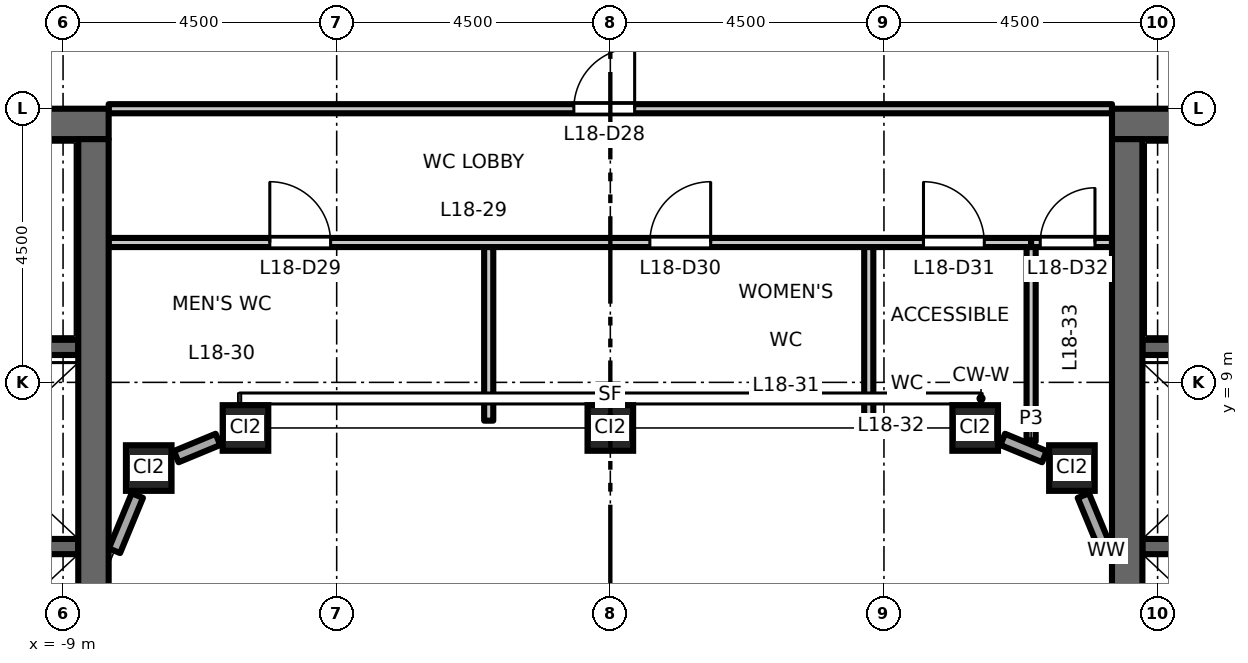
"""IFC4 building model, lengths in metres.
Left out: names, types, materials, properties, quantities, classifications, styles, units other than length and angle.
Written with IfcOpenShell. Run it as: python <this file> out.ifc"""

import sys

from ifc_helpers import new_model, si_unit, direction, frame, frame_2d, origin, origin_2d, place, context, subcontext, project, spatial, rectangle, hollow_rectangle, extrude, element, fill, save


model = new_model("IFC4")
c1 = context("Model", 3, precision=1e-05, world=origin(), true_north=direction((0.0, 1.0)))
c2 = subcontext(c1, "Body", "Model", "MODEL_VIEW")
j1 = project(units=[si_unit("LENGTHUNIT", "METRE"), si_unit("PLANEANGLEUNIT", "RADIAN")], contexts=[c1])
p1 = place(None, origin())
s1 = spatial("IfcSite", under=j1, at=p1, CompositionType="ELEMENT")
p2 = place(p1, origin())
s2 = spatial("IfcBuilding", under=s1, at=p2, CompositionType="ELEMENT")
p3 = place(p2, frame((0.0, 0.0, 85.2)))
s3 = spatial("IfcBuildingStorey", under=s2, at=p3, CompositionType="ELEMENT", Elevation=85.2)
for number, where, z_axis, x_axis in (
    (1, (-7.591, 7.591, 0.0), (0.0, 0.0, 1.0), (1.0, 0.0, 0.0)),
    (2, (-6.0, 8.25, 0.0), (0.0, 0.0, 1.0), (1.0, 0.0, 0.0)),
    (3, (0.0, 8.25, 0.0), (0.0, 0.0, 1.0), (1.0, 0.0, 0.0)),
    (4, (6.0, 8.25, 0.0), (0.0, 0.0, 1.0), (1.0, 0.0, 0.0)),
    (5, (7.591, 7.591, 0.0), (0.0, 0.0, 1.0), (1.0, 0.0, 0.0)),
):
    element("IfcColumn", number, at=place(p3, frame(where, z_axis=z_axis, x_axis=x_axis)), inside=s3, PredefinedType="COLUMN", context=c2, shape_type="SweptSolid", body=[
        extrude(hollow_rectangle(XDim=0.75, YDim=0.75, WallThickness=0.045, at=origin_2d()), origin(), (0.0, 0.0, 1.0), 4.5),
    ])
p4 = place(p3, frame((-8.75, 6.3, 0.0), z_axis=(0.0, 0.0, 1.0), x_axis=(-1.0, 0.0, 0.0)))
e6 = element("IfcWall", 6, at=p4, inside=s3, PredefinedType="SHEAR", context=c2, shape_type="SweptSolid", body=[
    extrude(rectangle(XDim=3.1, YDim=0.25, at=frame_2d((1.55, 0.0))), origin(), (0.0, 0.0, 1.0), 4.35),
])
p5 = place(p3, frame((-8.75, 9.575, 0.0), z_axis=(0.0, 0.0, 1.0), x_axis=(-1.0, 0.0, 0.0)))
e7 = element("IfcWall", 7, at=p5, inside=s3, PredefinedType="SHEAR", context=c2, shape_type="SweptSolid", body=[
    extrude(rectangle(XDim=8.0, YDim=0.25, at=frame_2d((4.0, 0.0))), origin(), (0.0, 0.0, 1.0), 4.35),
])
p6 = place(p5, frame((6.65, 0.0, 0.0)))
e8 = element("IfcOpeningElement", 8, at=p6, cuts=e7, PredefinedType="OPENING", context=c2, shape_type="SweptSolid", body=[
    extrude(rectangle(XDim=1.1, YDim=2.1, at=frame_2d((0.55, 1.05))), frame((0.0, 0.135, 0.0), z_axis=(0.0, -1.0, 0.0), x_axis=(1.0, 0.0, 0.0)), (0.0, 0.0, 1.0), 0.27),
])
p7 = place(p3, frame((-8.25, 13.25, 0.0), z_axis=(0.0, 0.0, 1.0), x_axis=(-1.0, 0.0, 0.0)))
e9 = element("IfcWall", 9, at=p7, inside=s3, PredefinedType="SHEAR", context=c2, shape_type="SweptSolid", body=[
    extrude(rectangle(XDim=13.5, YDim=0.5, at=frame_2d((6.75, 0.0))), origin(), (0.0, 0.0, 1.0), 4.35),
])
p8 = place(p3, frame((-8.5, -13.0, 0.0), z_axis=(0.0, 0.0, 1.0), x_axis=(0.0, 1.0, 0.0)))
e10 = element("IfcWall", 10, at=p8, inside=s3, PredefinedType="SHEAR", context=c2, shape_type="SweptSolid", body=[
    extrude(rectangle(XDim=26.0, YDim=0.5, at=frame_2d((13.0, 0.0))), origin(), (0.0, 0.0, 1.0), 4.35),
])
p9 = place(p3, frame((8.75, 6.3, 0.0), z_axis=(0.0, 0.0, 1.0), x_axis=(1.0, 0.0, 0.0)))
e11 = element("IfcWall", 11, at=p9, inside=s3, PredefinedType="SHEAR", context=c2, shape_type="SweptSolid", body=[
    extrude(rectangle(XDim=3.1, YDim=0.25, at=frame_2d((1.55, 0.0))), origin(), (0.0, 0.0, 1.0), 4.35),
])
p10 = place(p3, frame((8.75, 9.575, 0.0), z_axis=(0.0, 0.0, 1.0), x_axis=(1.0, 0.0, 0.0)))
e12 = element("IfcWall", 12, at=p10, inside=s3, PredefinedType="SHEAR", context=c2, shape_type="SweptSolid", body=[
    extrude(rectangle(XDim=8.0, YDim=0.25, at=frame_2d((4.0, 0.0))), origin(), (0.0, 0.0, 1.0), 4.35),
])
p11 = place(p10, frame((6.65, 0.0, 0.0)))
e13 = element("IfcOpeningElement", 13, at=p11, cuts=e12, PredefinedType="OPENING", context=c2, shape_type="SweptSolid", body=[
    extrude(rectangle(XDim=1.1, YDim=2.1, at=frame_2d((0.55, 1.05))), frame((0.0, 0.135, 0.0), z_axis=(0.0, -1.0, 0.0), x_axis=(1.0, 0.0, 0.0)), (0.0, 0.0, 1.0), 0.27),
])
p12 = place(p3, frame((8.25, 13.25, 0.0), z_axis=(0.0, 0.0, 1.0), x_axis=(1.0, 0.0, 0.0)))
e14 = element("IfcWall", 14, at=p12, inside=s3, PredefinedType="SHEAR", context=c2, shape_type="SweptSolid", body=[
    extrude(rectangle(XDim=13.5, YDim=0.5, at=frame_2d((6.75, 0.0))), origin(), (0.0, 0.0, 1.0), 4.35),
])
p13 = place(p3, frame((8.5, -13.0, 0.0), z_axis=(0.0, 0.0, 1.0), x_axis=(0.0, 1.0, 0.0)))
e15 = element("IfcWall", 15, at=p13, inside=s3, PredefinedType="SHEAR", context=c2, shape_type="SweptSolid", body=[
    extrude(rectangle(XDim=26.0, YDim=0.5, at=frame_2d((13.0, 0.0))), origin(), (0.0, 0.0, 1.0), 4.35),
])
p14 = place(p3, frame((8.154, 6.231, 0.0), z_axis=(0.0, 0.0, 1.0), x_axis=(-0.382549378284, 0.923935048136, 0.0)))
e16 = element("IfcWall", 16, at=p14, inside=s3, PredefinedType="STANDARD", context=c2, shape_type="SweptSolid", body=[
    extrude(rectangle(XDim=0.982, YDim=0.2, at=frame_2d((0.491, 0.0))), origin(), (0.0, 0.0, 1.0), 3.73),
])
for number, where, z_axis, x_axis in (
    (17, (7.138, 7.779, 0.0), (0.0, 0.0, 1.0), (-0.924, 0.383, 0.0)),
    (18, (-6.453, 8.062, 0.0), (0.0, 0.0, 1.0), (-0.924, -0.383, 0.0)),
):
    element("IfcWall", number, at=place(p3, frame(where, z_axis=z_axis, x_axis=x_axis)), inside=s3, PredefinedType="STANDARD", context=c2, shape_type="SweptSolid", body=[
        extrude(rectangle(XDim=0.742, YDim=0.2, at=frame_2d((0.371, 0.0))), origin(), (0.0, 0.0, 1.0), 3.73),
    ])
p15 = place(p3, frame((-7.779, 7.138, 0.0), z_axis=(0.0, 0.0, 1.0), x_axis=(-0.382549378284, -0.923935048136, 0.0)))
e19 = element("IfcWall", 19, at=p15, inside=s3, PredefinedType="STANDARD", context=c2, shape_type="SweptSolid", body=[
    extrude(rectangle(XDim=0.982, YDim=0.2, at=frame_2d((0.491, 0.0))), origin(), (0.0, 0.0, 1.0), 3.73),
])
p16 = place(p3, frame((-8.25, 11.3, 0.0), z_axis=(0.0, 0.0, 1.0), x_axis=(1.0, 0.0, 0.0)))
e20 = element("IfcWall", 20, at=p16, inside=s3, PredefinedType="PARTITIONING", context=c2, shape_type="SweptSolid", body=[
    extrude(rectangle(XDim=15.17, YDim=0.15, at=frame_2d((7.585, 0.0))), origin(), (0.0, 0.0, 1.0), 4.35),
])
p17 = place(p16, frame((2.65, 0.0, 0.0)))
e21 = element("IfcOpeningElement", 21, at=p17, cuts=e20, PredefinedType="OPENING", context=c2, shape_type="SweptSolid", body=[
    extrude(rectangle(XDim=1.0, YDim=2.1, at=frame_2d((0.5, 1.05))), frame((0.0, 0.085, 0.0), z_axis=(0.0, -1.0, 0.0), x_axis=(1.0, 0.0, 0.0)), (0.0, 0.0, 1.0), 0.17),
])
p18 = place(p16, frame((8.9, 0.0, 0.0)))
e22 = element("IfcOpeningElement", 22, at=p18, cuts=e20, PredefinedType="OPENING", context=c2, shape_type="SweptSolid", body=[
    extrude(rectangle(XDim=1.0, YDim=2.1, at=frame_2d((0.5, 1.05))), frame((0.0, 0.085, 0.0), z_axis=(0.0, -1.0, 0.0), x_axis=(1.0, 0.0, 0.0)), (0.0, 0.0, 1.0), 0.17),
])
p19 = place(p16, frame((13.4, 0.0, 0.0)))
e23 = element("IfcOpeningElement", 23, at=p19, cuts=e20, PredefinedType="OPENING", context=c2, shape_type="SweptSolid", body=[
    extrude(rectangle(XDim=1.0, YDim=2.1, at=frame_2d((0.5, 1.05))), frame((0.0, 0.085, 0.0), z_axis=(0.0, -1.0, 0.0), x_axis=(1.0, 0.0, 0.0)), (0.0, 0.0, 1.0), 0.17),
])
p20 = place(p3, frame((6.92, 11.3, 0.0), z_axis=(0.0, 0.0, 1.0), x_axis=(1.0, 0.0, 0.0)))
e24 = element("IfcWall", 24, at=p20, inside=s3, PredefinedType="PARTITIONING", context=c2, shape_type="SweptSolid", body=[
    extrude(rectangle(XDim=1.33, YDim=0.15, at=frame_2d((0.665, 0.0))), origin(), (0.0, 0.0, 1.0), 4.35),
])
p21 = place(p20, frame((0.15, 0.0, 0.0)))
e25 = element("IfcOpeningElement", 25, at=p21, cuts=e24, PredefinedType="OPENING", context=c2, shape_type="SweptSolid", body=[
    extrude(rectangle(XDim=0.9, YDim=2.1, at=frame_2d((0.45, 1.05))), frame((0.0, 0.085, 0.0), z_axis=(0.0, -1.0, 0.0), x_axis=(1.0, 0.0, 0.0)), (0.0, 0.0, 1.0), 0.17),
])
p22 = place(p3, frame((-8.25, 13.5, 0.0), z_axis=(0.0, 0.0, 1.0), x_axis=(1.0, 0.0, 0.0)))
e26 = element("IfcWall", 26, at=p22, inside=s3, PredefinedType="PARTITIONING", context=c2, shape_type="SweptSolid", body=[
    extrude(rectangle(XDim=16.5, YDim=0.15, at=frame_2d((8.25, 0.0))), origin(), (0.0, 0.0, 1.0), 3.85),
])
p23 = place(p22, frame((7.65, 0.0, 0.0)))
e27 = element("IfcOpeningElement", 27, at=p23, cuts=e26, PredefinedType="OPENING", context=c2, shape_type="SweptSolid", body=[
    extrude(rectangle(XDim=1.0, YDim=2.1, at=frame_2d((0.5, 1.05))), frame((0.0, 0.085, 0.0), z_axis=(0.0, -1.0, 0.0), x_axis=(1.0, 0.0, 0.0)), (0.0, 0.0, 1.0), 0.17),
])
for number, where, z_axis, x_axis in (
    (28, (-2.0, 8.37, 0.0), (0.0, 0.0, 1.0), (0.0, 1.0, 0.0)),
    (29, (4.25, 8.37, 0.0), (0.0, 0.0, 1.0), (0.0, 1.0, 0.0)),
):
    element("IfcWall", number, at=place(p3, frame(where, z_axis=z_axis, x_axis=x_axis)), inside=s3, PredefinedType="PARTITIONING", context=c2, shape_type="SweptSolid", body=[
        extrude(rectangle(XDim=2.855, YDim=0.15, at=frame_2d((1.427, 0.0))), origin(), (0.0, 0.0, 1.0), 4.35),
    ])
p24 = place(p3, frame((6.92, 8.028, 0.0), z_axis=(0.0, 0.0, 1.0), x_axis=(0.0, 1.0, 0.0)))
e30 = element("IfcWall", 30, at=p24, inside=s3, PredefinedType="PARTITIONING", context=c2, shape_type="SweptSolid", body=[
    extrude(rectangle(XDim=3.197, YDim=0.15, at=frame_2d((1.599, 0.0))), origin(), (0.0, 0.0, 1.0), 4.35),
])
p25 = place(p23, origin())
e31 = element("IfcDoor", 31, at=p25, inside=s3, OperationType="SINGLE_SWING_RIGHT", PredefinedType="DOOR", context=c2, shape_type="SweptSolid", body=[
    extrude(rectangle(XDim=1.0, YDim=2.1, at=frame_2d((0.5, 1.05))), frame((0.0, 0.025, 0.0), z_axis=(0.0, -1.0, 0.0), x_axis=(1.0, 0.0, 0.0)), (0.0, 0.0, 1.0), 0.05),
])
fill(e27, e31)
p26 = place(p17, origin())
e32 = element("IfcDoor", 32, at=p26, inside=s3, OperationType="SINGLE_SWING_LEFT", PredefinedType="DOOR", context=c2, shape_type="SweptSolid", body=[
    extrude(rectangle(XDim=1.0, YDim=2.1, at=frame_2d((0.5, 1.05))), frame((0.0, 0.025, 0.0), z_axis=(0.0, -1.0, 0.0), x_axis=(1.0, 0.0, 0.0)), (0.0, 0.0, 1.0), 0.05),
])
fill(e21, e32)
p27 = place(p18, origin())
e33 = element("IfcDoor", 33, at=p27, inside=s3, OperationType="SINGLE_SWING_RIGHT", PredefinedType="DOOR", context=c2, shape_type="SweptSolid", body=[
    extrude(rectangle(XDim=1.0, YDim=2.1, at=frame_2d((0.5, 1.05))), frame((0.0, 0.025, 0.0), z_axis=(0.0, -1.0, 0.0), x_axis=(1.0, 0.0, 0.0)), (0.0, 0.0, 1.0), 0.05),
])
fill(e22, e33)
p28 = place(p19, origin())
e34 = element("IfcDoor", 34, at=p28, inside=s3, OperationType="SINGLE_SWING_LEFT", PredefinedType="DOOR", context=c2, shape_type="SweptSolid", body=[
    extrude(rectangle(XDim=1.0, YDim=2.1, at=frame_2d((0.5, 1.05))), frame((0.0, 0.025, 0.0), z_axis=(0.0, -1.0, 0.0), x_axis=(1.0, 0.0, 0.0)), (0.0, 0.0, 1.0), 0.05),
])
fill(e23, e34)
p29 = place(p21, origin())
e35 = element("IfcDoor", 35, at=p29, inside=s3, OperationType="SINGLE_SWING_RIGHT", PredefinedType="DOOR", context=c2, shape_type="SweptSolid", body=[
    extrude(rectangle(XDim=0.9, YDim=2.1, at=frame_2d((0.45, 1.05))), frame((0.0, 0.025, 0.0), z_axis=(0.0, -1.0, 0.0), x_axis=(1.0, 0.0, 0.0)), (0.0, 0.0, 1.0), 0.05),
])
fill(e25, e35)
save(model, sys.argv[1])
